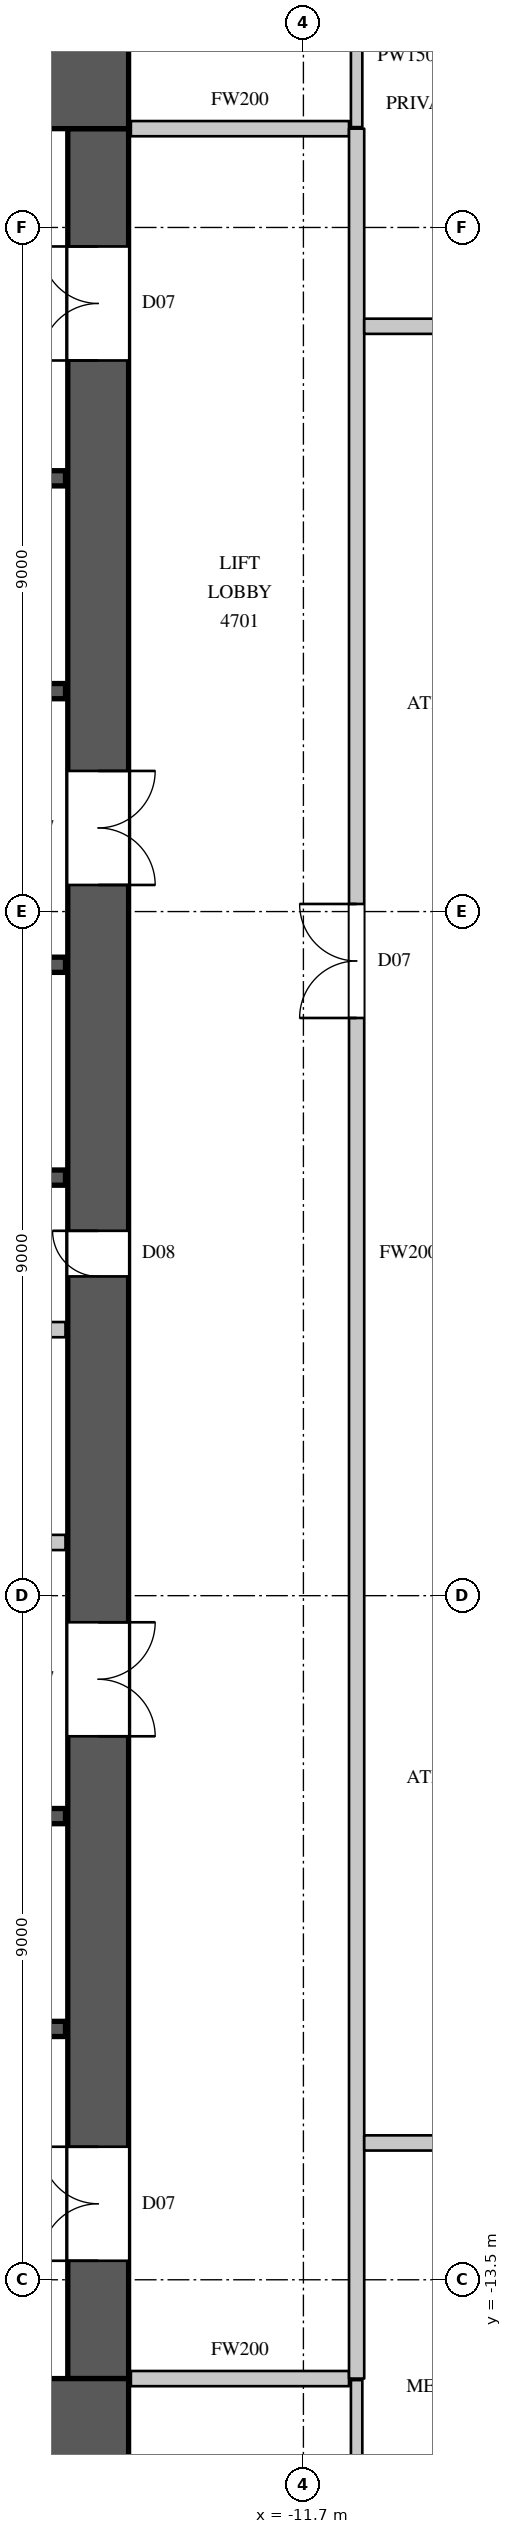
"""IFC4 building model, lengths in metres.
Left out: names, types, materials, properties, quantities, classifications, styles, units other than length and angle.
Written with IfcOpenShell. Run it as: python <this file> out.ifc"""

import sys

from ifc_helpers import new_model, si_unit, direction, frame, frame_2d, origin, place, context, subcontext, project, spatial, rectangle, extrude, element, fill, save


model = new_model("IFC4")
c1 = context("Model", 3, precision=1e-05, world=origin(), true_north=direction((0.0, 1.0)))
c2 = subcontext(c1, "Body", "Model", "MODEL_VIEW")
j1 = project(units=[si_unit("LENGTHUNIT", "METRE"), si_unit("PLANEANGLEUNIT", "RADIAN")], contexts=[c1])
p1 = place(None, origin())
s1 = spatial("IfcSite", under=j1, at=p1, CompositionType="ELEMENT")
p2 = place(p1, origin())
s2 = spatial("IfcBuilding", under=s1, at=p2, CompositionType="ELEMENT")
p3 = place(p2, frame((0.0, 0.0, 213.8)))
s3 = spatial("IfcBuildingStorey", under=s2, at=p3, CompositionType="ELEMENT", Elevation=213.8)
for number, where, z_axis, x_axis in (
    (1, (-30.0, 15.4, 0.0), (0.0, 0.0, 1.0), (1.0, 0.0, 0.0)),
    (2, (-30.0, -15.4, 0.0), (0.0, 0.0, 1.0), (1.0, 0.0, 0.0)),
):
    element("IfcWall", number, at=place(p3, frame(where, z_axis=z_axis, x_axis=x_axis)), inside=s3, PredefinedType="SHEAR", context=c2, shape_type="SweptSolid", body=[
        extrude(rectangle(XDim=16.0, YDim=1.2, at=frame_2d((8.0, 0.0))), origin(), (0.0, 0.0, 1.0), 4.1),
    ])
p4 = place(p3, frame((-14.4, -14.8, 0.0), z_axis=(0.0, 0.0, 1.0), x_axis=(0.0, 1.0, 0.0)))
e3 = element("IfcWall", 3, at=p4, inside=s3, PredefinedType="SHEAR", context=c2, shape_type="SweptSolid", body=[
    extrude(rectangle(XDim=29.6, YDim=0.8, at=frame_2d((14.8, 0.0))), origin(), (0.0, 0.0, 1.0), 4.1),
])
p5 = place(p4, frame((1.55, 0.0, 0.0)))
e4 = element("IfcOpeningElement", 4, at=p5, cuts=e3, PredefinedType="OPENING", context=c2, shape_type="SweptSolid", body=[
    extrude(rectangle(XDim=1.5, YDim=2.4, at=frame_2d((0.75, 1.2))), frame((0.0, 0.41, 0.0), z_axis=(0.0, -1.0, 0.0), x_axis=(1.0, 0.0, 0.0)), (0.0, 0.0, 1.0), 0.82),
])
p6 = place(p4, frame((26.55, 0.0, 0.0)))
e5 = element("IfcOpeningElement", 5, at=p6, cuts=e3, PredefinedType="OPENING", context=c2, shape_type="SweptSolid", body=[
    extrude(rectangle(XDim=1.5, YDim=2.4, at=frame_2d((0.75, 1.2))), frame((0.0, 0.41, 0.0), z_axis=(0.0, -1.0, 0.0), x_axis=(1.0, 0.0, 0.0)), (0.0, 0.0, 1.0), 0.82),
])
p7 = place(p4, frame((8.45, 0.0, 0.0)))
e6 = element("IfcOpeningElement", 6, at=p7, cuts=e3, PredefinedType="OPENING", context=c2, shape_type="SweptSolid", body=[
    extrude(rectangle(XDim=1.5, YDim=2.4, at=frame_2d((0.75, 1.2))), frame((0.0, 0.41, 0.0), z_axis=(0.0, -1.0, 0.0), x_axis=(1.0, 0.0, 0.0)), (0.0, 0.0, 1.0), 0.82),
])
p8 = place(p4, frame((19.65, 0.0, 0.0)))
e7 = element("IfcOpeningElement", 7, at=p8, cuts=e3, PredefinedType="OPENING", context=c2, shape_type="SweptSolid", body=[
    extrude(rectangle(XDim=1.5, YDim=2.4, at=frame_2d((0.75, 1.2))), frame((0.0, 0.41, 0.0), z_axis=(0.0, -1.0, 0.0), x_axis=(1.0, 0.0, 0.0)), (0.0, 0.0, 1.0), 0.82),
])
p9 = place(p4, frame((14.5, 0.0, 0.0)))
e8 = element("IfcOpeningElement", 8, at=p9, cuts=e3, PredefinedType="OPENING", context=c2, shape_type="SweptSolid", body=[
    extrude(rectangle(XDim=0.6, YDim=2.0, at=frame_2d((0.3, 1.0))), frame((0.0, 0.41, 0.0), z_axis=(0.0, -1.0, 0.0), x_axis=(1.0, 0.0, 0.0)), (0.0, 0.0, 1.0), 0.82),
])
p10 = place(p3, frame((-29.17, -3.8, 0.0), z_axis=(0.0, 0.0, 1.0), x_axis=(1.0, 0.0, 0.0)))
e9 = element("IfcWall", 9, at=p10, inside=s3, PredefinedType="PARTITIONING", context=c2, shape_type="SweptSolid", body=[
    extrude(rectangle(XDim=14.34, YDim=0.2, at=frame_2d((7.17, 0.0))), origin(), (0.0, 0.0, 1.0), 3.8),
])
p11 = place(p10, frame((3.6, 0.0, 0.0)))
e10 = element("IfcOpeningElement", 10, at=p11, cuts=e9, PredefinedType="OPENING", context=c2, shape_type="SweptSolid", body=[
    extrude(rectangle(XDim=0.9, YDim=2.2, at=frame_2d((0.45, 1.1))), frame((0.0, 0.11, 0.0), z_axis=(0.0, -1.0, 0.0), x_axis=(1.0, 0.0, 0.0)), (0.0, 0.0, 1.0), 0.22),
])
p12 = place(p10, frame((10.6, 0.0, 0.0)))
e11 = element("IfcOpeningElement", 11, at=p12, cuts=e9, PredefinedType="OPENING", context=c2, shape_type="SweptSolid", body=[
    extrude(rectangle(XDim=0.9, YDim=2.2, at=frame_2d((0.45, 1.1))), frame((0.0, 0.11, 0.0), z_axis=(0.0, -1.0, 0.0), x_axis=(1.0, 0.0, 0.0)), (0.0, 0.0, 1.0), 0.22),
])
for number, where, z_axis, x_axis in (
    (12, (-13.97, -14.8, 0.0), (0.0, 0.0, 1.0), (1.0, 0.0, 0.0)),
    (13, (-13.97, 14.8, 0.0), (0.0, 0.0, 1.0), (1.0, 0.0, 0.0)),
):
    element("IfcWall", number, at=place(p3, frame(where, z_axis=z_axis, x_axis=x_axis)), inside=s3, PredefinedType="PARTITIONING", context=c2, shape_type="SweptSolid", body=[
        extrude(rectangle(XDim=2.87, YDim=0.2, at=frame_2d((1.435, 0.0))), origin(), (0.0, 0.0, 1.0), 3.8),
    ])
p13 = place(p3, frame((-11.0, -14.8, 0.0), z_axis=(0.0, 0.0, 1.0), x_axis=(0.0, 1.0, 0.0)))
e14 = element("IfcWall", 14, at=p13, inside=s3, PredefinedType="PARTITIONING", context=c2, shape_type="SweptSolid", body=[
    extrude(rectangle(XDim=29.6, YDim=0.2, at=frame_2d((14.8, 0.0))), origin(), (0.0, 0.0, 1.0), 3.8),
])
p14 = place(p13, frame((17.9, 0.0, 0.0)))
e15 = element("IfcOpeningElement", 15, at=p14, cuts=e14, PredefinedType="OPENING", context=c2, shape_type="SweptSolid", body=[
    extrude(rectangle(XDim=1.5, YDim=2.4, at=frame_2d((0.75, 1.2))), frame((0.0, 0.11, 0.0), z_axis=(0.0, -1.0, 0.0), x_axis=(1.0, 0.0, 0.0)), (0.0, 0.0, 1.0), 0.22),
])
p15 = place(p3, frame((-10.9, -11.7, 0.0), z_axis=(0.0, 0.0, 1.0), x_axis=(1.0, 0.0, 0.0)))
e16 = element("IfcWall", 16, at=p15, inside=s3, PredefinedType="PARTITIONING", context=c2, shape_type="SweptSolid", body=[
    extrude(rectangle(XDim=21.5, YDim=0.2, at=frame_2d((10.75, 0.0))), origin(), (0.0, 0.0, 1.0), 3.8),
])
p16 = place(p15, frame((13.2, 0.0, 0.0)))
e17 = element("IfcOpeningElement", 17, at=p16, cuts=e16, PredefinedType="OPENING", context=c2, shape_type="SweptSolid", body=[
    extrude(rectangle(XDim=0.9, YDim=2.2, at=frame_2d((0.45, 1.1))), frame((0.0, 0.11, 0.0), z_axis=(0.0, -1.0, 0.0), x_axis=(1.0, 0.0, 0.0)), (0.0, 0.0, 1.0), 0.22),
])
p17 = place(p15, frame((16.5, 0.0, 0.0)))
e18 = element("IfcOpeningElement", 18, at=p17, cuts=e16, PredefinedType="OPENING", context=c2, shape_type="SweptSolid", body=[
    extrude(rectangle(XDim=0.9, YDim=2.2, at=frame_2d((0.45, 1.1))), frame((0.0, 0.11, 0.0), z_axis=(0.0, -1.0, 0.0), x_axis=(1.0, 0.0, 0.0)), (0.0, 0.0, 1.0), 0.22),
])
p18 = place(p15, frame((20.25, 0.0, 0.0)))
e19 = element("IfcOpeningElement", 19, at=p18, cuts=e16, PredefinedType="OPENING", context=c2, shape_type="SweptSolid", body=[
    extrude(rectangle(XDim=0.9, YDim=2.2, at=frame_2d((0.45, 1.1))), frame((0.0, 0.11, 0.0), z_axis=(0.0, -1.0, 0.0), x_axis=(1.0, 0.0, 0.0)), (0.0, 0.0, 1.0), 0.22),
])
p19 = place(p15, frame((1.25, 0.0, 0.0)))
e20 = element("IfcOpeningElement", 20, at=p19, cuts=e16, PredefinedType="OPENING", context=c2, shape_type="SweptSolid", body=[
    extrude(rectangle(XDim=1.1, YDim=2.4, at=frame_2d((0.55, 1.2))), frame((0.0, 0.11, 0.0), z_axis=(0.0, -1.0, 0.0), x_axis=(1.0, 0.0, 0.0)), (0.0, 0.0, 1.0), 0.22),
])
p20 = place(p15, frame((7.3, 0.0, 0.0)))
e21 = element("IfcOpeningElement", 21, at=p20, cuts=e16, PredefinedType="OPENING", context=c2, shape_type="SweptSolid", body=[
    extrude(rectangle(XDim=1.1, YDim=2.4, at=frame_2d((0.55, 1.2))), frame((0.0, 0.11, 0.0), z_axis=(0.0, -1.0, 0.0), x_axis=(1.0, 0.0, 0.0)), (0.0, 0.0, 1.0), 0.22),
])
p21 = place(p3, frame((-10.9, 12.2, 0.0), z_axis=(0.0, 0.0, 1.0), x_axis=(1.0, 0.0, 0.0)))
e22 = element("IfcWall", 22, at=p21, inside=s3, PredefinedType="PARTITIONING", context=c2, shape_type="SweptSolid", body=[
    extrude(rectangle(XDim=3.704, YDim=0.2, at=frame_2d((1.852, 0.0))), origin(), (0.0, 0.0, 1.0), 3.8),
])
p22 = place(p21, frame((1.7, 0.0, 0.0)))
e23 = element("IfcOpeningElement", 23, at=p22, cuts=e22, PredefinedType="OPENING", context=c2, shape_type="SweptSolid", body=[
    extrude(rectangle(XDim=1.1, YDim=2.4, at=frame_2d((0.55, 1.2))), frame((0.0, 0.11, 0.0), z_axis=(0.0, -1.0, 0.0), x_axis=(1.0, 0.0, 0.0)), (0.0, 0.0, 1.0), 0.22),
])
for number, where, z_axis, x_axis in (
    (24, (-11.0, -16.7, 0.0), (0.0, 0.0, 1.0), (0.0, 1.0, 0.0)),
    (25, (-11.0, 14.82, 0.0), (0.0, 0.0, 1.0), (0.0, 1.0, 0.0)),
):
    element("IfcWall", number, at=place(p3, frame(where, z_axis=z_axis, x_axis=x_axis)), inside=s3, PredefinedType="PARTITIONING", context=c2, shape_type="SweptSolid", body=[
        extrude(rectangle(XDim=1.88, YDim=0.15, at=frame_2d((0.94, 0.0))), origin(), (0.0, 0.0, 1.0), 3.8),
    ])
p23 = place(p3, frame((-29.17, -1.0, 0.0), z_axis=(0.0, 0.0, 1.0), x_axis=(1.0, 0.0, 0.0)))
e26 = element("IfcWall", 26, at=p23, inside=s3, PredefinedType="PARTITIONING", context=c2, shape_type="SweptSolid", body=[
    extrude(rectangle(XDim=14.34, YDim=0.2, at=frame_2d((7.17, 0.0))), origin(), (0.0, 0.0, 1.0), 3.8),
])
p24 = place(p3, frame((-26.08, 1.0, 0.0), z_axis=(0.0, 0.0, 1.0), x_axis=(1.0, 0.0, 0.0)))
e27 = element("IfcWall", 27, at=p24, inside=s3, PredefinedType="SHEAR", context=c2, shape_type="SweptSolid", body=[
    extrude(rectangle(XDim=11.25, YDim=0.2, at=frame_2d((5.625, 0.0))), origin(), (0.0, 0.0, 1.0), 3.8),
])
p25 = place(p3, frame((-26.08, 3.8, 0.0), z_axis=(0.0, 0.0, 1.0), x_axis=(1.0, 0.0, 0.0)))
e28 = element("IfcWall", 28, at=p25, inside=s3, PredefinedType="SHEAR", context=c2, shape_type="SweptSolid", body=[
    extrude(rectangle(XDim=11.25, YDim=0.2, at=frame_2d((5.625, 0.0))), origin(), (0.0, 0.0, 1.0), 3.8),
])
p26 = place(p25, frame((0.8, 0.0, 0.0)))
e29 = element("IfcOpeningElement", 29, at=p26, cuts=e28, PredefinedType="OPENING", context=c2, shape_type="SweptSolid", body=[
    extrude(rectangle(XDim=1.1, YDim=2.2, at=frame_2d((0.55, 1.1))), frame((0.0, 0.11, 0.0), z_axis=(0.0, -1.0, 0.0), x_axis=(1.0, 0.0, 0.0)), (0.0, 0.0, 1.0), 0.22),
])
p27 = place(p25, frame((3.55, 0.0, 0.0)))
e30 = element("IfcOpeningElement", 30, at=p27, cuts=e28, PredefinedType="OPENING", context=c2, shape_type="SweptSolid", body=[
    extrude(rectangle(XDim=1.1, YDim=2.2, at=frame_2d((0.55, 1.1))), frame((0.0, 0.11, 0.0), z_axis=(0.0, -1.0, 0.0), x_axis=(1.0, 0.0, 0.0)), (0.0, 0.0, 1.0), 0.22),
])
p28 = place(p25, frame((6.25, 0.0, 0.0)))
e31 = element("IfcOpeningElement", 31, at=p28, cuts=e28, PredefinedType="OPENING", context=c2, shape_type="SweptSolid", body=[
    extrude(rectangle(XDim=1.1, YDim=2.2, at=frame_2d((0.55, 1.1))), frame((0.0, 0.11, 0.0), z_axis=(0.0, -1.0, 0.0), x_axis=(1.0, 0.0, 0.0)), (0.0, 0.0, 1.0), 0.22),
])
p29 = place(p25, frame((9.15, 0.0, 0.0)))
e32 = element("IfcOpeningElement", 32, at=p29, cuts=e28, PredefinedType="OPENING", context=c2, shape_type="SweptSolid", body=[
    extrude(rectangle(XDim=1.1, YDim=2.2, at=frame_2d((0.55, 1.1))), frame((0.0, 0.11, 0.0), z_axis=(0.0, -1.0, 0.0), x_axis=(1.0, 0.0, 0.0)), (0.0, 0.0, 1.0), 0.22),
])
p30 = place(p3, frame((-17.92, -10.2, 0.0), z_axis=(0.0, 0.0, 1.0), x_axis=(1.0, 0.0, 0.0)))
e33 = element("IfcWall", 33, at=p30, inside=s3, PredefinedType="SHEAR", context=c2, shape_type="SweptSolid", body=[
    extrude(rectangle(XDim=3.09, YDim=0.2, at=frame_2d((1.545, 0.0))), origin(), (0.0, 0.0, 1.0), 3.8),
])
p31 = place(p30, frame((1.0, 0.0, 0.0)))
e34 = element("IfcOpeningElement", 34, at=p31, cuts=e33, PredefinedType="OPENING", context=c2, shape_type="SweptSolid", body=[
    extrude(rectangle(XDim=1.1, YDim=2.2, at=frame_2d((0.55, 1.1))), frame((0.0, 0.11, 0.0), z_axis=(0.0, -1.0, 0.0), x_axis=(1.0, 0.0, 0.0)), (0.0, 0.0, 1.0), 0.22),
])
p32 = place(p3, frame((-17.9, -7.4, 0.0), z_axis=(0.0, 0.0, 1.0), x_axis=(1.0, 0.0, 0.0)))
e35 = element("IfcWall", 35, at=p32, inside=s3, PredefinedType="SHEAR", context=c2, shape_type="SweptSolid", body=[
    extrude(rectangle(XDim=3.07, YDim=0.2, at=frame_2d((1.535, 0.0))), origin(), (0.0, 0.0, 1.0), 3.8),
])
p33 = place(p3, frame((-17.92, 7.4, 0.0), z_axis=(0.0, 0.0, 1.0), x_axis=(1.0, 0.0, 0.0)))
e36 = element("IfcWall", 36, at=p33, inside=s3, PredefinedType="SHEAR", context=c2, shape_type="SweptSolid", body=[
    extrude(rectangle(XDim=3.09, YDim=0.2, at=frame_2d((1.545, 0.0))), origin(), (0.0, 0.0, 1.0), 3.8),
])
p34 = place(p3, frame((-17.92, 10.2, 0.0), z_axis=(0.0, 0.0, 1.0), x_axis=(1.0, 0.0, 0.0)))
e37 = element("IfcWall", 37, at=p34, inside=s3, PredefinedType="SHEAR", context=c2, shape_type="SweptSolid", body=[
    extrude(rectangle(XDim=3.09, YDim=0.2, at=frame_2d((1.545, 0.0))), origin(), (0.0, 0.0, 1.0), 3.8),
])
p35 = place(p34, frame((1.0, 0.0, 0.0)))
e38 = element("IfcOpeningElement", 38, at=p35, cuts=e37, PredefinedType="OPENING", context=c2, shape_type="SweptSolid", body=[
    extrude(rectangle(XDim=1.1, YDim=2.2, at=frame_2d((0.55, 1.1))), frame((0.0, 0.11, 0.0), z_axis=(0.0, -1.0, 0.0), x_axis=(1.0, 0.0, 0.0)), (0.0, 0.0, 1.0), 0.22),
])
p36 = place(p14, origin())
e39 = element("IfcDoor", 39, at=p36, inside=s3, OperationType="DOUBLE_DOOR_SINGLE_SWING", PredefinedType="DOOR", context=c2, shape_type="SweptSolid", body=[
    extrude(rectangle(XDim=1.5, YDim=2.4, at=frame_2d((0.75, 1.2))), frame((0.0, 0.025, 0.0), z_axis=(0.0, -1.0, 0.0), x_axis=(1.0, 0.0, 0.0)), (0.0, 0.0, 1.0), 0.05),
])
fill(e15, e39)
p37 = place(p5, origin())
e40 = element("IfcDoor", 40, at=p37, inside=s3, OperationType="DOUBLE_DOOR_SINGLE_SWING", PredefinedType="DOOR", context=c2, shape_type="SweptSolid", body=[
    extrude(rectangle(XDim=1.5, YDim=2.4, at=frame_2d((0.75, 1.2))), frame((0.0, 0.395, 0.0), z_axis=(0.0, -1.0, 0.0), x_axis=(1.0, 0.0, 0.0)), (0.0, 0.0, 1.0), 0.05),
])
fill(e4, e40)
p38 = place(p6, origin())
e41 = element("IfcDoor", 41, at=p38, inside=s3, OperationType="DOUBLE_DOOR_SINGLE_SWING", PredefinedType="DOOR", context=c2, shape_type="SweptSolid", body=[
    extrude(rectangle(XDim=1.5, YDim=2.4, at=frame_2d((0.75, 1.2))), frame((0.0, 0.395, 0.0), z_axis=(0.0, -1.0, 0.0), x_axis=(1.0, 0.0, 0.0)), (0.0, 0.0, 1.0), 0.05),
])
fill(e5, e41)
p39 = place(p7, origin())
e42 = element("IfcDoor", 42, at=p39, inside=s3, OperationType="DOUBLE_DOOR_SINGLE_SWING", PredefinedType="DOOR", context=c2, shape_type="SweptSolid", body=[
    extrude(rectangle(XDim=1.5, YDim=2.4, at=frame_2d((0.75, 1.2))), frame((0.0, -0.345, 0.0), z_axis=(0.0, -1.0, 0.0), x_axis=(1.0, 0.0, 0.0)), (0.0, 0.0, 1.0), 0.05),
])
fill(e6, e42)
p40 = place(p8, origin())
e43 = element("IfcDoor", 43, at=p40, inside=s3, OperationType="DOUBLE_DOOR_SINGLE_SWING", PredefinedType="DOOR", context=c2, shape_type="SweptSolid", body=[
    extrude(rectangle(XDim=1.5, YDim=2.4, at=frame_2d((0.75, 1.2))), frame((0.0, -0.345, 0.0), z_axis=(0.0, -1.0, 0.0), x_axis=(1.0, 0.0, 0.0)), (0.0, 0.0, 1.0), 0.05),
])
fill(e7, e43)
p41 = place(p9, origin())
e44 = element("IfcDoor", 44, at=p41, inside=s3, OperationType="SINGLE_SWING_RIGHT", PredefinedType="DOOR", context=c2, shape_type="SweptSolid", body=[
    extrude(rectangle(XDim=0.6, YDim=2.0, at=frame_2d((0.3, 1.0))), frame((0.0, 0.395, 0.0), z_axis=(0.0, -1.0, 0.0), x_axis=(1.0, 0.0, 0.0)), (0.0, 0.0, 1.0), 0.05),
])
fill(e8, e44)
save(model, sys.argv[1])
